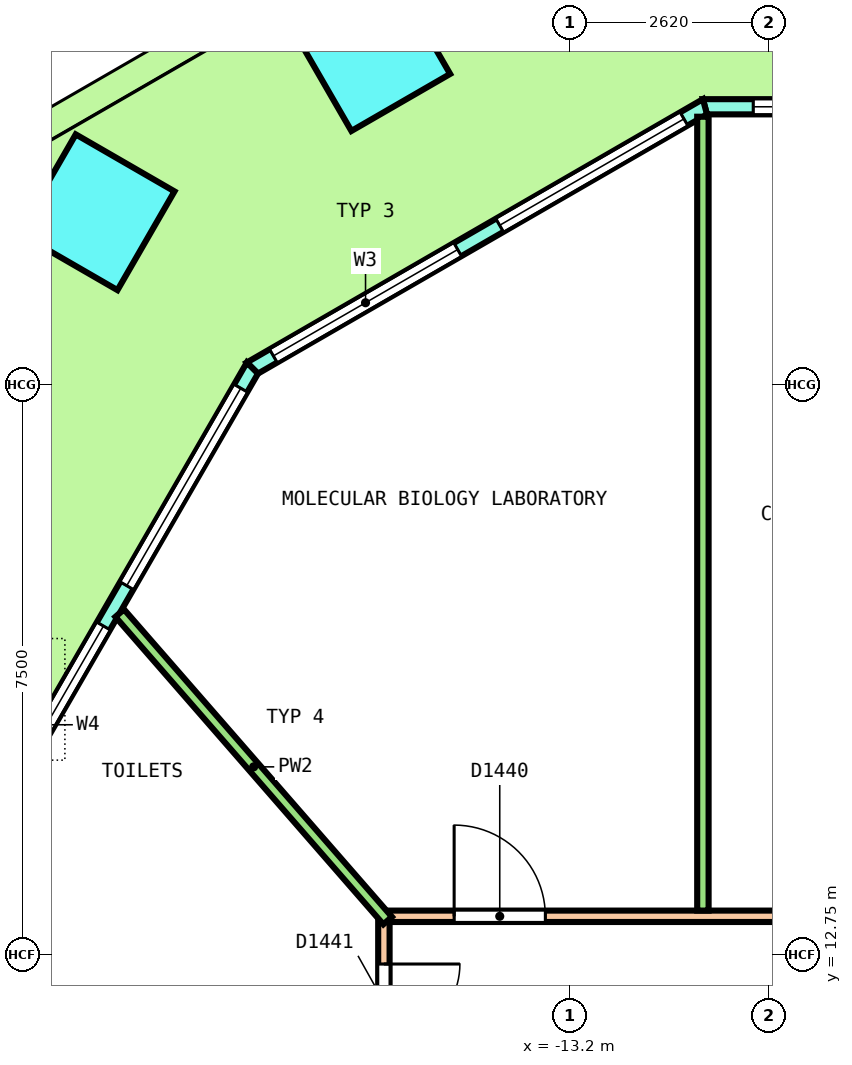
"""IFC4 building model, lengths in metres.
Left out: names, types, materials, properties, quantities, classifications, styles, units other than length and angle.
Written with IfcOpenShell. Run it as: python <this file> out.ifc"""

import sys

from ifc_helpers import new_model, si_unit, direction, frame, frame_2d, origin, origin_2d, place, context, subcontext, project, spatial, polyline, rectangle, outline, extrude, element, fill, save


model = new_model("IFC4")
c1 = context("Model", 3, precision=1e-05, world=origin(), true_north=direction((0.0, 1.0)))
c2 = subcontext(c1, "Body", "Model", "MODEL_VIEW")
j1 = project(units=[si_unit("LENGTHUNIT", "METRE"), si_unit("PLANEANGLEUNIT", "RADIAN")], contexts=[c1])
p1 = place(None, origin())
s1 = spatial("IfcSite", under=j1, at=p1, CompositionType="ELEMENT")
p2 = place(p1, origin())
s2 = spatial("IfcBuilding", under=s1, at=p2, CompositionType="ELEMENT")
p3 = place(p2, frame((0.0, 0.0, 58.6)))
s3 = spatial("IfcBuildingStorey", under=s2, at=p3, CompositionType="ELEMENT", Elevation=58.6)
for number, where, z_axis, x_axis in (
    (1, (-15.803, 24.606, 0.0), (0.0, 0.0, 1.0), (-0.866, -0.5, 0.0)),
    (2, (-19.43, 22.512, 0.0), (0.0, 0.0, 1.0), (-0.5, -0.866, 0.0)),
):
    element("IfcColumn", number, at=place(p3, frame(where, z_axis=z_axis, x_axis=x_axis)), inside=s3, PredefinedType="COLUMN", context=c2, shape_type="SweptSolid", body=[
        extrude(rectangle(XDim=1.5, YDim=1.5, at=origin_2d()), origin(), (0.0, 0.0, 1.0), 4.05),
    ])
p4 = place(p3, frame((11.426, 23.9, 0.0), z_axis=(0.0, 0.0, 1.0), x_axis=(-1.0, 0.0, 0.0)))
e3 = element("IfcWall", 3, at=p4, inside=s3, PredefinedType="SOLIDWALL", context=c2, shape_type="SweptSolid", body=[
    extrude(outline(polyline([(-0.027, -0.1), (1.014, -0.1), (2.055, -0.1), (3.097, -0.1), (4.138, -0.1), (5.179, -0.1), (6.22, -0.1), (7.261, -0.1), (8.303, -0.1), (9.344, -0.1), (10.385, -0.1), (11.426, -0.1), (12.468, -0.1), (13.509, -0.1), (14.55, -0.1), (15.591, -0.1), (16.632, -0.1), (17.673, -0.1), (18.715, -0.1), (19.756, -0.1), (20.797, -0.1), (21.838, -0.1), (22.879, -0.1), (22.826, 0.1), (21.789, 0.1), (20.753, 0.1), (19.717, 0.1), (18.68, 0.1), (17.644, 0.1), (16.608, 0.1), (15.572, 0.1), (14.535, 0.1), (13.499, 0.1), (12.463, 0.1), (11.426, 0.1), (10.39, 0.1), (9.354, 0.1), (8.317, 0.1), (7.281, 0.1), (6.245, 0.1), (5.208, 0.1), (4.172, 0.1), (3.136, 0.1), (2.099, 0.1), (1.063, 0.1), (0.027, 0.1), (-0.027, -0.1)])), origin(), (0.0, 0.0, 1.0), 4.1),
])
p5 = place(p4, frame((0.635, 0.0, 0.1)))
e4 = element("IfcOpeningElement", 4, at=p5, cuts=e3, PredefinedType="OPENING", context=c2, shape_type="SweptSolid", body=[
    extrude(rectangle(XDim=3.3, YDim=2.9, at=frame_2d((1.65, 1.45))), frame((0.0, 0.11, 0.0), z_axis=(0.0, -1.0, 0.0), x_axis=(1.0, 0.0, 0.0)), (0.0, 0.0, 1.0), 0.22),
])
p6 = place(p4, frame((5.206, 0.0, 0.1)))
e5 = element("IfcOpeningElement", 5, at=p6, cuts=e3, PredefinedType="OPENING", context=c2, shape_type="SweptSolid", body=[
    extrude(rectangle(XDim=3.3, YDim=2.9, at=frame_2d((1.65, 1.45))), frame((0.0, 0.11, 0.0), z_axis=(0.0, -1.0, 0.0), x_axis=(1.0, 0.0, 0.0)), (0.0, 0.0, 1.0), 0.22),
])
p7 = place(p4, frame((10.526, 0.0, 0.0)))
e6 = element("IfcOpeningElement", 6, at=p7, cuts=e3, PredefinedType="OPENING", context=c2, shape_type="SweptSolid", body=[
    extrude(rectangle(XDim=1.8, YDim=2.4, at=frame_2d((0.9, 1.2))), frame((0.0, 0.11, 0.0), z_axis=(0.0, -1.0, 0.0), x_axis=(1.0, 0.0, 0.0)), (0.0, 0.0, 1.0), 0.22),
])
p8 = place(p4, frame((10.526, 0.0, 2.55)))
e7 = element("IfcOpeningElement", 7, at=p8, cuts=e3, PredefinedType="OPENING", context=c2, shape_type="SweptSolid", body=[
    extrude(rectangle(XDim=1.8, YDim=0.45, at=frame_2d((0.9, 0.225))), frame((0.0, 0.11, 0.0), z_axis=(0.0, -1.0, 0.0), x_axis=(1.0, 0.0, 0.0)), (0.0, 0.0, 1.0), 0.22),
])
p9 = place(p4, frame((14.347, 0.0, 0.1)))
e8 = element("IfcOpeningElement", 8, at=p9, cuts=e3, PredefinedType="OPENING", context=c2, shape_type="SweptSolid", body=[
    extrude(rectangle(XDim=3.3, YDim=2.9, at=frame_2d((1.65, 1.45))), frame((0.0, 0.11, 0.0), z_axis=(0.0, -1.0, 0.0), x_axis=(1.0, 0.0, 0.0)), (0.0, 0.0, 1.0), 0.22),
])
p10 = place(p4, frame((18.917, 0.0, 0.1)))
e9 = element("IfcOpeningElement", 9, at=p10, cuts=e3, PredefinedType="OPENING", context=c2, shape_type="SweptSolid", body=[
    extrude(rectangle(XDim=3.3, YDim=2.9, at=frame_2d((1.65, 1.45))), frame((0.0, 0.11, 0.0), z_axis=(0.0, -1.0, 0.0), x_axis=(1.0, 0.0, 0.0)), (0.0, 0.0, 1.0), 0.22),
])
p11 = place(p3, frame((-11.426, 23.9, 0.0), z_axis=(0.0, 0.0, 1.0), x_axis=(-0.866029458321, -0.49999297727, 0.0)))
e10 = element("IfcWall", 10, at=p11, inside=s3, PredefinedType="SOLIDWALL", context=c2, shape_type="SweptSolid", body=[
    extrude(outline(polyline([(-0.027, -0.1), (1.128, -0.1), (2.282, -0.1), (3.437, -0.1), (4.592, -0.1), (5.747, -0.1), (6.901, -0.1), (6.848, 0.1), (5.711, 0.1), (4.574, 0.1), (3.437, 0.1), (2.301, 0.1), (1.164, 0.1), (0.027, 0.1), (-0.027, -0.1)])), origin(), (0.0, 0.0, 1.0), 4.1),
])
p12 = place(p11, frame((0.319, 0.0, 0.1)))
e11 = element("IfcOpeningElement", 11, at=p12, cuts=e10, PredefinedType="OPENING", context=c2, shape_type="SweptSolid", body=[
    extrude(rectangle(XDim=2.8, YDim=2.9, at=frame_2d((1.4, 1.45))), frame((0.0, 0.11, 0.0), z_axis=(0.0, -1.0, 0.0), x_axis=(1.0, 0.0, 0.0)), (0.0, 0.0, 1.0), 0.22),
])
p13 = place(p11, frame((3.756, 0.0, 0.1)))
e12 = element("IfcOpeningElement", 12, at=p13, cuts=e10, PredefinedType="OPENING", context=c2, shape_type="SweptSolid", body=[
    extrude(rectangle(XDim=2.8, YDim=2.9, at=frame_2d((1.4, 1.45))), frame((0.0, 0.11, 0.0), z_axis=(0.0, -1.0, 0.0), x_axis=(1.0, 0.0, 0.0)), (0.0, 0.0, 1.0), 0.22),
])
p14 = place(p3, frame((-17.38, 20.463, 0.0), z_axis=(0.0, 0.0, 1.0), x_axis=(-0.500000137386, -0.866025324465, 0.0)))
e13 = element("IfcWall", 13, at=p14, inside=s3, PredefinedType="SOLIDWALL", context=c2, shape_type="SweptSolid", body=[
    extrude(outline(polyline([(-0.027, -0.1), (0.979, -0.1), (1.986, -0.1), (2.992, -0.1), (3.999, -0.1), (5.005, -0.1), (6.012, -0.1), (7.018, -0.1), (8.025, -0.1), (9.031, -0.1), (10.038, -0.1), (11.044, -0.1), (12.051, -0.1), (13.057, -0.1), (14.063, -0.1), (15.07, -0.1), (16.076, -0.1), (17.083, -0.1), (18.089, -0.1), (18.036, 0.1), (17.035, 0.1), (16.035, 0.1), (15.034, 0.1), (14.034, 0.1), (13.033, 0.1), (12.033, 0.1), (11.032, 0.1), (10.032, 0.1), (9.031, 0.1), (8.031, 0.1), (7.03, 0.1), (6.03, 0.1), (5.029, 0.1), (4.029, 0.1), (3.028, 0.1), (2.028, 0.1), (1.027, 0.1), (0.027, 0.1), (-0.027, -0.1)])), origin(), (0.0, 0.0, 1.0), 4.1),
])
p15 = place(p14, frame((0.306, 0.0, 0.1)))
e14 = element("IfcOpeningElement", 14, at=p15, cuts=e13, PredefinedType="OPENING", context=c2, shape_type="SweptSolid", body=[
    extrude(rectangle(XDim=3.0, YDim=2.9, at=frame_2d((1.5, 1.45))), frame((0.0, 0.11, 0.0), z_axis=(0.0, -1.0, 0.0), x_axis=(1.0, 0.0, 0.0)), (0.0, 0.0, 1.0), 0.22),
])
p16 = place(p14, frame((3.919, 0.0, 0.1)))
e15 = element("IfcOpeningElement", 15, at=p16, cuts=e13, PredefinedType="OPENING", context=c2, shape_type="SweptSolid", body=[
    extrude(rectangle(XDim=3.0, YDim=2.9, at=frame_2d((1.5, 1.45))), frame((0.0, 0.11, 0.0), z_axis=(0.0, -1.0, 0.0), x_axis=(1.0, 0.0, 0.0)), (0.0, 0.0, 1.0), 0.22),
])
p17 = place(p14, frame((8.131, 0.0, 0.0)))
e16 = element("IfcOpeningElement", 16, at=p17, cuts=e13, PredefinedType="OPENING", context=c2, shape_type="SweptSolid", body=[
    extrude(rectangle(XDim=1.8, YDim=2.4, at=frame_2d((0.9, 1.2))), frame((0.0, 0.11, 0.0), z_axis=(0.0, -1.0, 0.0), x_axis=(1.0, 0.0, 0.0)), (0.0, 0.0, 1.0), 0.22),
])
p18 = place(p14, frame((8.131, 0.0, 2.55)))
e17 = element("IfcOpeningElement", 17, at=p18, cuts=e13, PredefinedType="OPENING", context=c2, shape_type="SweptSolid", body=[
    extrude(rectangle(XDim=1.8, YDim=0.45, at=frame_2d((0.9, 0.225))), frame((0.0, 0.11, 0.0), z_axis=(0.0, -1.0, 0.0), x_axis=(1.0, 0.0, 0.0)), (0.0, 0.0, 1.0), 0.22),
])
p19 = place(p14, frame((11.144, 0.0, 0.1)))
e18 = element("IfcOpeningElement", 18, at=p19, cuts=e13, PredefinedType="OPENING", context=c2, shape_type="SweptSolid", body=[
    extrude(rectangle(XDim=3.0, YDim=2.9, at=frame_2d((1.5, 1.45))), frame((0.0, 0.11, 0.0), z_axis=(0.0, -1.0, 0.0), x_axis=(1.0, 0.0, 0.0)), (0.0, 0.0, 1.0), 0.22),
])
p20 = place(p14, frame((14.756, 0.0, 0.1)))
e19 = element("IfcOpeningElement", 19, at=p20, cuts=e13, PredefinedType="OPENING", context=c2, shape_type="SweptSolid", body=[
    extrude(rectangle(XDim=3.0, YDim=2.9, at=frame_2d((1.5, 1.45))), frame((0.0, 0.11, 0.0), z_axis=(0.0, -1.0, 0.0), x_axis=(1.0, 0.0, 0.0)), (0.0, 0.0, 1.0), 0.22),
])
p21 = place(p3, frame((-15.575, 13.25, 0.0), z_axis=(0.0, 0.0, 1.0), x_axis=(1.0, 0.0, 0.0)))
e20 = element("IfcWall", 20, at=p21, inside=s3, PredefinedType="PARTITIONING", context=c2, shape_type="SweptSolid", body=[
    extrude(rectangle(XDim=31.175, YDim=0.15, at=frame_2d((15.587, 0.0))), origin(), (0.0, 0.0, 1.0), 3.05),
])
p22 = place(p21, frame((28.252, 0.0, 0.0)))
e21 = element("IfcOpeningElement", 21, at=p22, cuts=e20, PredefinedType="OPENING", context=c2, shape_type="SweptSolid", body=[
    extrude(rectangle(XDim=1.0, YDim=2.1, at=frame_2d((0.5, 1.05))), frame((0.0, 0.085, 0.0), z_axis=(0.0, -1.0, 0.0), x_axis=(1.0, 0.0, 0.0)), (0.0, 0.0, 1.0), 0.17),
])
p23 = place(p21, frame((14.802, 0.0, 0.0)))
e22 = element("IfcOpeningElement", 22, at=p23, cuts=e20, PredefinedType="OPENING", context=c2, shape_type="SweptSolid", body=[
    extrude(rectangle(XDim=1.2, YDim=2.1, at=frame_2d((0.6, 1.05))), frame((0.0, 0.085, 0.0), z_axis=(0.0, -1.0, 0.0), x_axis=(1.0, 0.0, 0.0)), (0.0, 0.0, 1.0), 0.17),
])
p24 = place(p21, frame((5.812, 0.0, 0.0)))
e23 = element("IfcOpeningElement", 23, at=p24, cuts=e20, PredefinedType="OPENING", context=c2, shape_type="SweptSolid", body=[
    extrude(rectangle(XDim=1.2, YDim=2.1, at=frame_2d((0.6, 1.05))), frame((0.0, 0.085, 0.0), z_axis=(0.0, -1.0, 0.0), x_axis=(1.0, 0.0, 0.0)), (0.0, 0.0, 1.0), 0.17),
])
p25 = place(p21, frame((0.849, 0.0, 0.0)))
e24 = element("IfcOpeningElement", 24, at=p25, cuts=e20, PredefinedType="OPENING", context=c2, shape_type="SweptSolid", body=[
    extrude(rectangle(XDim=1.2, YDim=2.1, at=frame_2d((0.6, 1.05))), frame((0.0, 0.085, 0.0), z_axis=(0.0, -1.0, 0.0), x_axis=(1.0, 0.0, 0.0)), (0.0, 0.0, 1.0), 0.17),
])
p26 = place(p3, frame((-15.65, -13.175, 0.0), z_axis=(0.0, 0.0, 1.0), x_axis=(0.0, 1.0, 0.0)))
e25 = element("IfcWall", 25, at=p26, inside=s3, PredefinedType="PARTITIONING", context=c2, shape_type="SweptSolid", body=[
    extrude(rectangle(XDim=26.35, YDim=0.15, at=frame_2d((13.175, 0.0))), origin(), (0.0, 0.0, 1.0), 3.05),
])
p27 = place(p26, frame((24.797, 0.0, 0.0)))
e26 = element("IfcOpeningElement", 26, at=p27, cuts=e25, PredefinedType="OPENING", context=c2, shape_type="SweptSolid", body=[
    extrude(rectangle(XDim=1.0, YDim=2.1, at=frame_2d((0.5, 1.05))), frame((0.0, 0.085, 0.0), z_axis=(0.0, -1.0, 0.0), x_axis=(1.0, 0.0, 0.0)), (0.0, 0.0, 1.0), 0.17),
])
p28 = place(p26, frame((21.346, 0.0, 0.0)))
e27 = element("IfcOpeningElement", 27, at=p28, cuts=e25, PredefinedType="OPENING", context=c2, shape_type="SweptSolid", body=[
    extrude(rectangle(XDim=1.0, YDim=2.1, at=frame_2d((0.5, 1.05))), frame((0.0, 0.085, 0.0), z_axis=(0.0, -1.0, 0.0), x_axis=(1.0, 0.0, 0.0)), (0.0, 0.0, 1.0), 0.17),
])
p29 = place(p26, frame((8.046, 0.0, 0.0)))
e28 = element("IfcOpeningElement", 28, at=p29, cuts=e25, PredefinedType="OPENING", context=c2, shape_type="SweptSolid", body=[
    extrude(rectangle(XDim=1.2, YDim=2.1, at=frame_2d((0.6, 1.05))), frame((0.0, 0.085, 0.0), z_axis=(0.0, -1.0, 0.0), x_axis=(1.0, 0.0, 0.0)), (0.0, 0.0, 1.0), 0.17),
])
p30 = place(p3, frame((-11.453, 13.325, 0.0), z_axis=(0.0, 0.0, 1.0), x_axis=(0.0, 1.0, 0.0)))
e29 = element("IfcWall", 29, at=p30, inside=s3, PredefinedType="PARTITIONING", context=c2, shape_type="SweptSolid", body=[
    extrude(rectangle(XDim=10.444, YDim=0.15, at=frame_2d((5.222, 0.0))), origin(), (0.0, 0.0, 1.0), 3.05),
])
p31 = place(p3, frame((-19.126, 17.239, 0.0), z_axis=(0.0, 0.0, 1.0), x_axis=(0.65698603945, -0.753902741717, 0.0)))
e30 = element("IfcWall", 30, at=p31, inside=s3, PredefinedType="PARTITIONING", context=c2, shape_type="SweptSolid", body=[
    extrude(rectangle(XDim=5.366, YDim=0.15, at=frame_2d((2.683, 0.0))), origin(), (0.0, 0.0, 1.0), 3.05),
])
p32 = place(p10, origin())
e31 = element("IfcWindow", 31, at=p32, inside=s3, PartitioningType="SINGLE_PANEL", PredefinedType="WINDOW", context=c2, shape_type="SweptSolid", body=[
    extrude(rectangle(XDim=3.3, YDim=2.9, at=frame_2d((1.65, 1.45))), frame((0.0, 0.03, 0.0), z_axis=(0.0, -1.0, 0.0), x_axis=(1.0, 0.0, 0.0)), (0.0, 0.0, 1.0), 0.06),
])
fill(e9, e31)
p33 = place(p12, origin())
e32 = element("IfcWindow", 32, at=p33, inside=s3, PartitioningType="SINGLE_PANEL", PredefinedType="WINDOW", context=c2, shape_type="SweptSolid", body=[
    extrude(rectangle(XDim=2.8, YDim=2.9, at=frame_2d((1.4, 1.45))), frame((0.0, 0.03, 0.0), z_axis=(0.0, -1.0, 0.0), x_axis=(1.0, 0.0, 0.0)), (0.0, 0.0, 1.0), 0.06),
])
fill(e11, e32)
p34 = place(p13, origin())
e33 = element("IfcWindow", 33, at=p34, inside=s3, PartitioningType="SINGLE_PANEL", PredefinedType="WINDOW", context=c2, shape_type="SweptSolid", body=[
    extrude(rectangle(XDim=2.8, YDim=2.9, at=frame_2d((1.4, 1.45))), frame((0.0, 0.03, 0.0), z_axis=(0.0, -1.0, 0.0), x_axis=(1.0, 0.0, 0.0)), (0.0, 0.0, 1.0), 0.06),
])
fill(e12, e33)
p35 = place(p15, origin())
e34 = element("IfcWindow", 34, at=p35, inside=s3, PartitioningType="SINGLE_PANEL", PredefinedType="WINDOW", context=c2, shape_type="SweptSolid", body=[
    extrude(rectangle(XDim=3.0, YDim=2.9, at=frame_2d((1.5, 1.45))), frame((0.0, 0.03, 0.0), z_axis=(0.0, -1.0, 0.0), x_axis=(1.0, 0.0, 0.0)), (0.0, 0.0, 1.0), 0.06),
])
fill(e14, e34)
p36 = place(p16, origin())
e35 = element("IfcWindow", 35, at=p36, inside=s3, PartitioningType="SINGLE_PANEL", PredefinedType="WINDOW", context=c2, shape_type="SweptSolid", body=[
    extrude(rectangle(XDim=3.0, YDim=2.9, at=frame_2d((1.5, 1.45))), frame((0.0, 0.03, 0.0), z_axis=(0.0, -1.0, 0.0), x_axis=(1.0, 0.0, 0.0)), (0.0, 0.0, 1.0), 0.06),
])
fill(e15, e35)
p37 = place(p25, origin())
e36 = element("IfcDoor", 36, at=p37, inside=s3, OperationType="DOUBLE_DOOR_SINGLE_SWING", PredefinedType="DOOR", context=c2, shape_type="SweptSolid", body=[
    extrude(rectangle(XDim=1.2, YDim=2.1, at=frame_2d((0.6, 1.05))), frame((0.0, 0.025, 0.0), z_axis=(0.0, -1.0, 0.0), x_axis=(1.0, 0.0, 0.0)), (0.0, 0.0, 1.0), 0.05),
])
fill(e24, e36)
p38 = place(p27, origin())
e37 = element("IfcDoor", 37, at=p38, inside=s3, OperationType="SINGLE_SWING_RIGHT", PredefinedType="DOOR", context=c2, shape_type="SweptSolid", body=[
    extrude(rectangle(XDim=1.0, YDim=2.1, at=frame_2d((0.5, 1.05))), frame((0.0, 0.025, 0.0), z_axis=(0.0, -1.0, 0.0), x_axis=(1.0, 0.0, 0.0)), (0.0, 0.0, 1.0), 0.05),
])
fill(e26, e37)
save(model, sys.argv[1])
